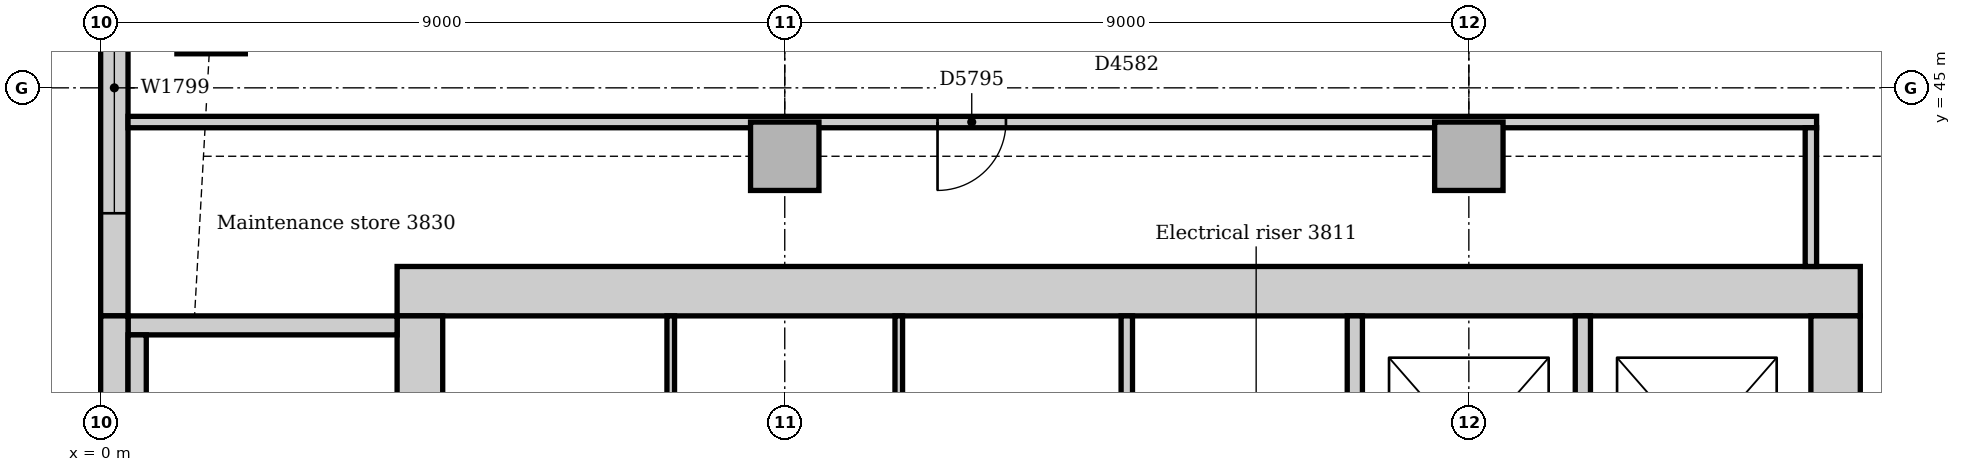
"""IFC4 building model, lengths in metres.
Left out: names, types, materials, properties, quantities, classifications, styles, units other than length and angle.
Written with IfcOpenShell. Run it as: python <this file> out.ifc"""

import sys

from ifc_helpers import new_model, si_unit, direction, frame, frame_2d, origin, origin_2d, place, context, subcontext, project, spatial, rectangle, extrude, element, fill, save


model = new_model("IFC4")
c1 = context("Model", 3, precision=1e-05, world=origin(), true_north=direction((0.0, 1.0)))
c2 = subcontext(c1, "Body", "Model", "MODEL_VIEW")
j1 = project(units=[si_unit("LENGTHUNIT", "METRE"), si_unit("PLANEANGLEUNIT", "RADIAN")], contexts=[c1])
p1 = place(None, origin())
s1 = spatial("IfcSite", under=j1, at=p1, CompositionType="ELEMENT")
p2 = place(p1, origin())
s2 = spatial("IfcBuilding", under=s1, at=p2, CompositionType="ELEMENT")
p3 = place(p2, frame((0.0, 0.0, 161.0)))
s3 = spatial("IfcBuildingStorey", under=s2, at=p3, CompositionType="ELEMENT", Elevation=161.0)
p4 = place(p3, frame((23.15, 42.325, 0.0), z_axis=(0.0, 0.0, 1.0), x_axis=(-1.0, 0.0, 0.0)))
e1 = element("IfcWall", 1, at=p4, inside=s3, PredefinedType="SOLIDWALL", context=c2, shape_type="SweptSolid", body=[
    extrude(rectangle(XDim=19.25, YDim=0.65, at=frame_2d((9.625, 0.0))), origin(), (0.0, 0.0, 1.0), 4.0),
])
p5 = place(p3, frame((22.825, 31.5, 0.0), z_axis=(0.0, 0.0, 1.0), x_axis=(0.0, 1.0, 0.0)))
e2 = element("IfcWall", 2, at=p5, inside=s3, PredefinedType="SOLIDWALL", context=c2, shape_type="SweptSolid", body=[
    extrude(rectangle(XDim=10.5, YDim=0.65, at=frame_2d((5.25, 0.0))), origin(), (0.0, 0.0, 1.0), 4.0),
])
p6 = place(p5, frame((3.15, 0.0, 0.0)))
e3 = element("IfcOpeningElement", 3, at=p6, cuts=e2, PredefinedType="OPENING", context=c2, shape_type="SweptSolid", body=[
    extrude(rectangle(XDim=1.0, YDim=2.1, at=frame_2d((0.5, 1.05))), frame((0.0, 0.335, 0.0), z_axis=(0.0, -1.0, 0.0), x_axis=(1.0, 0.0, 0.0)), (0.0, 0.0, 1.0), 0.67),
])
p7 = place(p5, frame((5.2, 0.0, 0.0)))
e4 = element("IfcOpeningElement", 4, at=p7, cuts=e2, PredefinedType="OPENING", context=c2, shape_type="SweptSolid", body=[
    extrude(rectangle(XDim=1.0, YDim=2.1, at=frame_2d((0.5, 1.05))), frame((0.0, 0.335, 0.0), z_axis=(0.0, -1.0, 0.0), x_axis=(1.0, 0.0, 0.0)), (0.0, 0.0, 1.0), 0.67),
])
p8 = place(p3, frame((4.2, 42.0, 0.0), z_axis=(0.0, 0.0, 1.0), x_axis=(0.0, -1.0, 0.0)))
e5 = element("IfcWall", 5, at=p8, inside=s3, PredefinedType="SOLIDWALL", context=c2, shape_type="SweptSolid", body=[
    extrude(rectangle(XDim=10.5, YDim=0.6, at=frame_2d((5.25, 0.0))), origin(), (0.0, 0.0, 1.0), 4.0),
])
p9 = place(p8, frame((5.3, 0.0, 0.0)))
e6 = element("IfcOpeningElement", 6, at=p9, cuts=e5, PredefinedType="OPENING", context=c2, shape_type="SweptSolid", body=[
    extrude(rectangle(XDim=1.0, YDim=2.1, at=frame_2d((0.5, 1.05))), frame((0.0, 0.31, 0.0), z_axis=(0.0, -1.0, 0.0), x_axis=(1.0, 0.0, 0.0)), (0.0, 0.0, 1.0), 0.62),
])
p10 = place(p3, frame((3.9, 41.875, 0.0), z_axis=(0.0, 0.0, 1.0), x_axis=(-1.0, 0.0, 0.0)))
e7 = element("IfcWall", 7, at=p10, inside=s3, PredefinedType="SOLIDWALL", context=c2, shape_type="SweptSolid", body=[
    extrude(rectangle(XDim=3.54, YDim=0.25, at=frame_2d((1.77, 0.0))), origin(), (0.0, 0.0, 1.0), 4.0),
])
for number, where, z_axis, x_axis in (
    (8, (1.453, 45.898, 0.0), (0.0, 0.0, 1.0), (1.0, 0.0, 0.0)),
    (9, (9.0, 44.1, 0.0), (0.0, 0.0, 1.0), (1.0, 0.0, 0.0)),
    (10, (18.0, 44.1, 0.0), (0.0, 0.0, 1.0), (1.0, 0.0, 0.0)),
):
    element("IfcColumn", number, at=place(p3, frame(where, z_axis=z_axis, x_axis=x_axis)), inside=s3, PredefinedType="COLUMN", context=c2, shape_type="SweptSolid", body=[
        extrude(rectangle(XDim=0.9, YDim=0.9, at=origin_2d()), origin(), (0.0, 0.0, 1.0), 3.85),
    ])
p11 = place(p3, frame((0.18, 49.757, 0.0), z_axis=(0.0, 0.0, 1.0), x_axis=(0.0, -1.0, 0.0)))
e11 = element("IfcWall", 11, at=p11, inside=s3, PredefinedType="STANDARD", context=c2, shape_type="SweptSolid", body=[
    extrude(rectangle(XDim=7.757, YDim=0.36, at=frame_2d((3.879, 0.0))), origin(), (0.0, 0.0, 1.0), 3.85),
])
p12 = place(p11, frame((3.107, 0.0, 0.9)))
e12 = element("IfcOpeningElement", 12, at=p12, cuts=e11, PredefinedType="OPENING", context=c2, shape_type="SweptSolid", body=[
    extrude(rectangle(XDim=3.3, YDim=1.6, at=frame_2d((1.65, 0.8))), frame((0.0, 0.19, 0.0), z_axis=(0.0, -1.0, 0.0), x_axis=(1.0, 0.0, 0.0)), (0.0, 0.0, 1.0), 0.38),
])
p13 = place(p3, frame((0.18, 42.0, 0.0), z_axis=(0.0, 0.0, 1.0), x_axis=(0.0, -1.0, 0.0)))
e13 = element("IfcWall", 13, at=p13, inside=s3, PredefinedType="STANDARD", context=c2, shape_type="SweptSolid", body=[
    extrude(rectangle(XDim=6.75, YDim=0.36, at=frame_2d((3.375, 0.0))), origin(), (0.0, 0.0, 1.0), 3.85),
])
p14 = place(p3, frame((0.48, 40.13, 0.0), z_axis=(0.0, 0.0, 1.0), x_axis=(0.0, 1.0, 0.0)))
e14 = element("IfcWall", 14, at=p14, inside=s3, PredefinedType="STANDARD", context=c2, shape_type="SweptSolid", body=[
    extrude(rectangle(XDim=1.62, YDim=0.24, at=frame_2d((0.81, 0.0))), origin(), (0.0, 0.0, 1.0), 4.0),
])
for number, where, z_axis, x_axis in (
    (15, (16.5, 38.6, 0.0), (0.0, 0.0, 1.0), (0.0, 1.0, 0.0)),
    (16, (19.5, 38.6, 0.0), (0.0, 0.0, 1.0), (0.0, 1.0, 0.0)),
):
    element("IfcWall", number, at=place(p3, frame(where, z_axis=z_axis, x_axis=x_axis)), inside=s3, PredefinedType="PARTITIONING", context=c2, shape_type="SweptSolid", body=[
        extrude(rectangle(XDim=3.4, YDim=0.2, at=frame_2d((1.7, 0.0))), origin(), (0.0, 0.0, 1.0), 3.85),
    ])
p15 = place(p3, frame((0.36, 44.55, 0.0), z_axis=(0.0, 0.0, 1.0), x_axis=(1.0, 0.0, 0.0)))
e17 = element("IfcWall", 17, at=p15, inside=s3, PredefinedType="PARTITIONING", context=c2, shape_type="SweptSolid", body=[
    extrude(rectangle(XDim=22.215, YDim=0.15, at=frame_2d((11.107, 0.0))), origin(), (0.0, 0.0, 1.0), 3.85),
])
p16 = place(p15, frame((10.65, 0.0, 0.0)))
e18 = element("IfcOpeningElement", 18, at=p16, cuts=e17, PredefinedType="OPENING", context=c2, shape_type="SweptSolid", body=[
    extrude(rectangle(XDim=0.9, YDim=2.1, at=frame_2d((0.45, 1.05))), frame((0.0, 0.085, 0.0), z_axis=(0.0, -1.0, 0.0), x_axis=(1.0, 0.0, 0.0)), (0.0, 0.0, 1.0), 0.17),
])
p17 = place(p3, frame((22.5, 42.65, 0.0), z_axis=(0.0, 0.0, 1.0), x_axis=(0.0, 1.0, 0.0)))
e19 = element("IfcWall", 19, at=p17, inside=s3, PredefinedType="PARTITIONING", context=c2, shape_type="SweptSolid", body=[
    extrude(rectangle(XDim=1.825, YDim=0.15, at=frame_2d((0.912, 0.0))), origin(), (0.0, 0.0, 1.0), 3.85),
])
p18 = place(p3, frame((13.5, 38.575, 0.0), z_axis=(0.0, 0.0, 1.0), x_axis=(0.0, 1.0, 0.0)))
e20 = element("IfcWall", 20, at=p18, inside=s3, PredefinedType="PARTITIONING", context=c2, shape_type="SweptSolid", body=[
    extrude(rectangle(XDim=3.425, YDim=0.15, at=frame_2d((1.712, 0.0))), origin(), (0.0, 0.0, 1.0), 3.85),
])
for number, where, z_axis, x_axis in (
    (21, (7.5, 38.575, 0.0), (0.0, 0.0, 1.0), (0.0, 1.0, 0.0)),
    (22, (10.5, 38.575, 0.0), (0.0, 0.0, 1.0), (0.0, 1.0, 0.0)),
):
    element("IfcWall", number, at=place(p3, frame(where, z_axis=z_axis, x_axis=x_axis)), inside=s3, PredefinedType="PARTITIONING", context=c2, shape_type="SweptSolid", body=[
        extrude(rectangle(XDim=3.425, YDim=0.1, at=frame_2d((1.712, 0.0))), origin(), (0.0, 0.0, 1.0), 3.85),
    ])
p19 = place(p12, origin())
e23 = element("IfcWindow", 23, at=p19, inside=s3, PartitioningType="SINGLE_PANEL", PredefinedType="WINDOW", context=c2, shape_type="SweptSolid", body=[
    extrude(rectangle(XDim=3.3, YDim=1.6, at=frame_2d((1.65, 0.8))), frame((0.0, 0.13, 0.0), z_axis=(0.0, -1.0, 0.0), x_axis=(1.0, 0.0, 0.0)), (0.0, 0.0, 1.0), 0.06),
])
fill(e12, e23)
p20 = place(p16, frame((0.9, 0.0, 0.0), z_axis=(0.0, 0.0, 1.0), x_axis=(-1.0, 0.0, 0.0)))
e24 = element("IfcDoor", 24, at=p20, inside=s3, OperationType="SINGLE_SWING_RIGHT", PredefinedType="DOOR", context=c2, shape_type="SweptSolid", body=[
    extrude(rectangle(XDim=0.9, YDim=2.1, at=frame_2d((0.45, 1.05))), frame((0.0, 0.025, 0.0), z_axis=(0.0, -1.0, 0.0), x_axis=(1.0, 0.0, 0.0)), (0.0, 0.0, 1.0), 0.05),
])
fill(e18, e24)
save(model, sys.argv[1])
